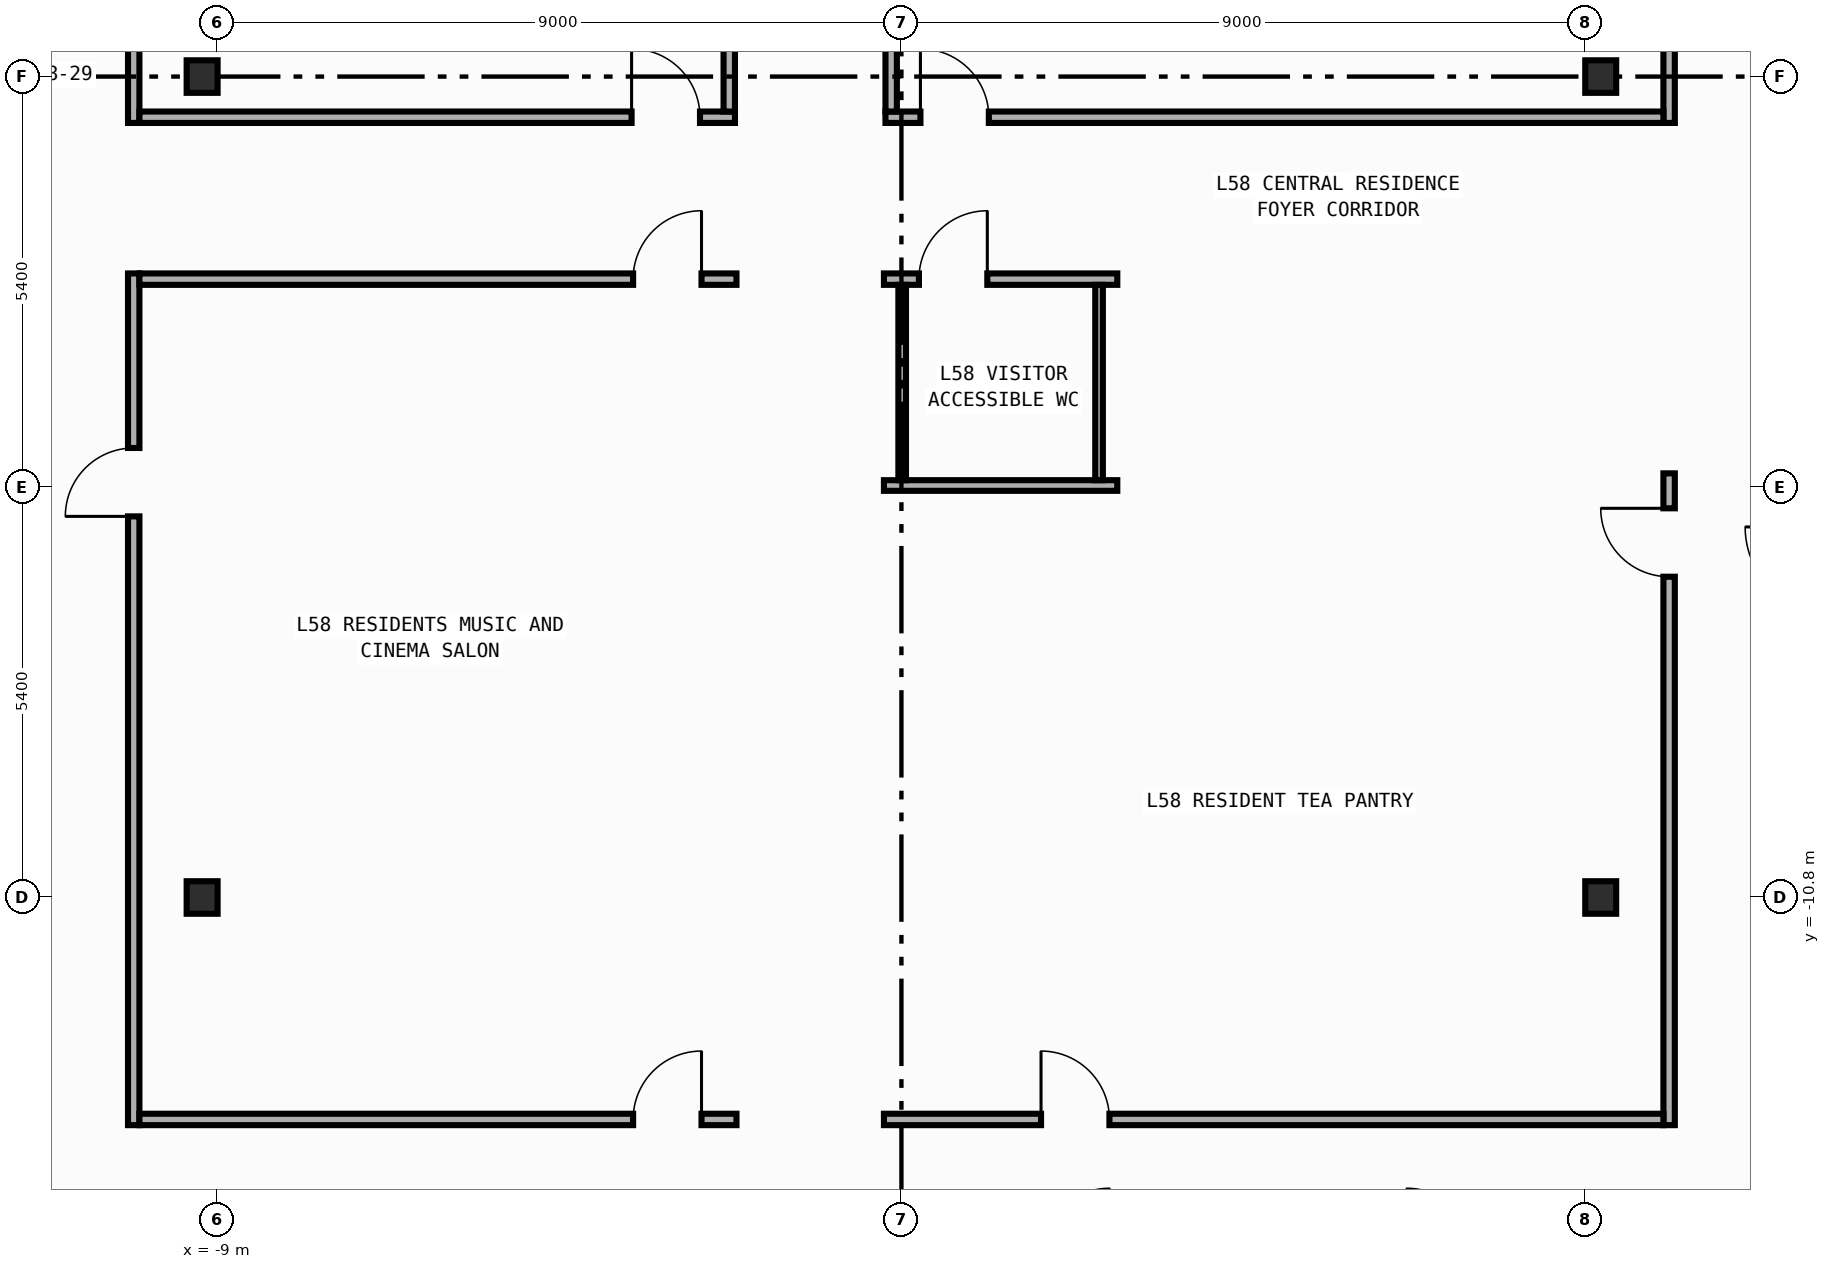
"""IFC4 building model, lengths in metres.
Left out: names, types, materials, properties, quantities, classifications, styles, units other than length and angle.
Written with IfcOpenShell. Run it as: python <this file> out.ifc"""

import sys

from ifc_helpers import new_model, si_unit, direction, frame, frame_2d, origin, origin_2d, place, context, subcontext, project, spatial, rectangle, i_section, extrude, element, fill, save


model = new_model("IFC4")
c1 = context("Model", 3, precision=1e-05, world=origin(), true_north=direction((0.0, 1.0)))
c2 = subcontext(c1, "Body", "Model", "MODEL_VIEW")
j1 = project(units=[si_unit("LENGTHUNIT", "METRE"), si_unit("PLANEANGLEUNIT", "RADIAN")], contexts=[c1])
p1 = place(None, origin())
s1 = spatial("IfcSite", under=j1, at=p1, CompositionType="ELEMENT")
p2 = place(p1, origin())
s2 = spatial("IfcBuilding", under=s1, at=p2, CompositionType="ELEMENT")
p3 = place(p2, frame((0.0, 0.0, 247.6)))
s3 = spatial("IfcBuildingStorey", under=s2, at=p3, CompositionType="ELEMENT", Elevation=247.6)
for number, where, z_axis, x_axis in (
    (1, (-9.2, -10.8, 0.0), (0.0, 0.0, 1.0), (1.0, 0.0, 0.0)),
    (2, (-9.2, 0.0, 0.0), (0.0, 0.0, 1.0), (1.0, 0.0, 0.0)),
    (3, (9.2, -10.8, 0.0), (0.0, 0.0, 1.0), (1.0, 0.0, 0.0)),
    (4, (9.2, 0.0, 0.0), (0.0, 0.0, 1.0), (1.0, 0.0, 0.0)),
):
    element("IfcColumn", number, at=place(p3, frame(where, z_axis=z_axis, x_axis=x_axis)), inside=s3, PredefinedType="COLUMN", context=c2, shape_type="SweptSolid", body=[
        extrude(i_section(OverallWidth=0.407, OverallDepth=0.428, WebThickness=0.02, FlangeThickness=0.035, FilletRadius=0.022, at=origin_2d()), origin(), (0.0, 0.0, 1.0), 3.6),
    ])
p4 = place(p3, frame((-10.1, -0.61, 0.0), z_axis=(0.0, 0.0, 1.0), x_axis=(0.0, 1.0, 0.0)))
e5 = element("IfcWall", 5, at=p4, inside=s3, PredefinedType="PARTITIONING", context=c2, shape_type="SweptSolid", body=[
    extrude(rectangle(XDim=14.405, YDim=0.15, at=frame_2d((7.203, 0.0))), origin(), (0.0, 0.0, 1.0), 3.34),
])
p5 = place(p4, frame((5.535, 0.0, 0.0)))
e6 = element("IfcOpeningElement", 6, at=p5, cuts=e5, PredefinedType="OPENING", context=c2, shape_type="SweptSolid", body=[
    extrude(rectangle(XDim=0.9, YDim=2.15, at=frame_2d((0.45, 1.075))), frame((0.0, 0.085, 0.0), z_axis=(0.0, -1.0, 0.0), x_axis=(1.0, 0.0, 0.0)), (0.0, 0.0, 1.0), 0.17),
])
p6 = place(p3, frame((-10.1, -13.795, 0.0), z_axis=(0.0, 0.0, 1.0), x_axis=(0.0, 1.0, 0.0)))
e7 = element("IfcWall", 7, at=p6, inside=s3, PredefinedType="PARTITIONING", context=c2, shape_type="SweptSolid", body=[
    extrude(rectangle(XDim=11.205, YDim=0.15, at=frame_2d((5.603, 0.0))), origin(), (0.0, 0.0, 1.0), 3.34),
])
p7 = place(p6, frame((8.009, 0.0, 0.0)))
e8 = element("IfcOpeningElement", 8, at=p7, cuts=e7, PredefinedType="OPENING", context=c2, shape_type="SweptSolid", body=[
    extrude(rectangle(XDim=0.9, YDim=2.15, at=frame_2d((0.45, 1.075))), frame((0.0, 0.085, 0.0), z_axis=(0.0, -1.0, 0.0), x_axis=(1.0, 0.0, 0.0)), (0.0, 0.0, 1.0), 0.17),
])
p8 = place(p3, frame((10.1, -0.61, 0.0), z_axis=(0.0, 0.0, 1.0), x_axis=(0.0, 1.0, 0.0)))
e9 = element("IfcWall", 9, at=p8, inside=s3, PredefinedType="PARTITIONING", context=c2, shape_type="SweptSolid", body=[
    extrude(rectangle(XDim=14.405, YDim=0.15, at=frame_2d((7.203, 0.0))), origin(), (0.0, 0.0, 1.0), 3.34),
])
p9 = place(p8, frame((5.535, 0.0, 0.0)))
e10 = element("IfcOpeningElement", 10, at=p9, cuts=e9, PredefinedType="OPENING", context=c2, shape_type="SweptSolid", body=[
    extrude(rectangle(XDim=0.9, YDim=2.15, at=frame_2d((0.45, 1.075))), frame((0.0, 0.085, 0.0), z_axis=(0.0, -1.0, 0.0), x_axis=(1.0, 0.0, 0.0)), (0.0, 0.0, 1.0), 0.17),
])
p10 = place(p3, frame((10.1, -13.795, 0.0), z_axis=(0.0, 0.0, 1.0), x_axis=(0.0, 1.0, 0.0)))
e11 = element("IfcWall", 11, at=p10, inside=s3, PredefinedType="PARTITIONING", context=c2, shape_type="SweptSolid", body=[
    extrude(rectangle(XDim=8.575, YDim=0.15, at=frame_2d((4.288, 0.0))), origin(), (0.0, 0.0, 1.0), 3.34),
])
p11 = place(p10, frame((7.215, 0.0, 0.0)))
e12 = element("IfcOpeningElement", 12, at=p11, cuts=e11, PredefinedType="OPENING", context=c2, shape_type="SweptSolid", body=[
    extrude(rectangle(XDim=0.9, YDim=2.15, at=frame_2d((0.45, 1.075))), frame((0.0, 0.085, 0.0), z_axis=(0.0, -1.0, 0.0), x_axis=(1.0, 0.0, 0.0)), (0.0, 0.0, 1.0), 0.17),
])
p12 = place(p3, frame((-10.025, -0.535, 0.0), z_axis=(0.0, 0.0, 1.0), x_axis=(1.0, 0.0, 0.0)))
e13 = element("IfcWall", 13, at=p12, inside=s3, PredefinedType="PARTITIONING", context=c2, shape_type="SweptSolid", body=[
    extrude(rectangle(XDim=7.835, YDim=0.15, at=frame_2d((3.917, 0.0))), origin(), (0.0, 0.0, 1.0), 3.34),
])
p13 = place(p12, frame((6.475, 0.0, 0.0)))
e14 = element("IfcOpeningElement", 14, at=p13, cuts=e13, PredefinedType="OPENING", context=c2, shape_type="SweptSolid", body=[
    extrude(rectangle(XDim=0.9, YDim=2.15, at=frame_2d((0.45, 1.075))), frame((0.0, 0.085, 0.0), z_axis=(0.0, -1.0, 0.0), x_axis=(1.0, 0.0, 0.0)), (0.0, 0.0, 1.0), 0.17),
])
p14 = place(p3, frame((-10.025, -2.665, 0.0), z_axis=(0.0, 0.0, 1.0), x_axis=(1.0, 0.0, 0.0)))
e15 = element("IfcWall", 15, at=p14, inside=s3, PredefinedType="PARTITIONING", context=c2, shape_type="SweptSolid", body=[
    extrude(rectangle(XDim=7.855, YDim=0.15, at=frame_2d((3.927, 0.0))), origin(), (0.0, 0.0, 1.0), 3.34),
])
p15 = place(p14, frame((6.495, 0.0, 0.0)))
e16 = element("IfcOpeningElement", 16, at=p15, cuts=e15, PredefinedType="OPENING", context=c2, shape_type="SweptSolid", body=[
    extrude(rectangle(XDim=0.9, YDim=2.15, at=frame_2d((0.45, 1.075))), frame((0.0, 0.085, 0.0), z_axis=(0.0, -1.0, 0.0), x_axis=(1.0, 0.0, 0.0)), (0.0, 0.0, 1.0), 0.17),
])
p16 = place(p3, frame((-0.21, -0.535, 0.0), z_axis=(0.0, 0.0, 1.0), x_axis=(1.0, 0.0, 0.0)))
e17 = element("IfcWall", 17, at=p16, inside=s3, PredefinedType="PARTITIONING", context=c2, shape_type="SweptSolid", body=[
    extrude(rectangle(XDim=10.235, YDim=0.15, at=frame_2d((5.117, 0.0))), origin(), (0.0, 0.0, 1.0), 3.34),
])
p17 = place(p16, frame((0.46, 0.0, 0.0)))
e18 = element("IfcOpeningElement", 18, at=p17, cuts=e17, PredefinedType="OPENING", context=c2, shape_type="SweptSolid", body=[
    extrude(rectangle(XDim=0.9, YDim=2.15, at=frame_2d((0.45, 1.075))), frame((0.0, 0.085, 0.0), z_axis=(0.0, -1.0, 0.0), x_axis=(1.0, 0.0, 0.0)), (0.0, 0.0, 1.0), 0.17),
])
p18 = place(p3, frame((-0.23, -2.665, 0.0), z_axis=(0.0, 0.0, 1.0), x_axis=(1.0, 0.0, 0.0)))
e19 = element("IfcWall", 19, at=p18, inside=s3, PredefinedType="PARTITIONING", context=c2, shape_type="SweptSolid", body=[
    extrude(rectangle(XDim=3.07, YDim=0.15, at=frame_2d((1.535, 0.0))), origin(), (0.0, 0.0, 1.0), 3.34),
])
p19 = place(p18, frame((0.46, 0.0, 0.0)))
e20 = element("IfcOpeningElement", 20, at=p19, cuts=e19, PredefinedType="OPENING", context=c2, shape_type="SweptSolid", body=[
    extrude(rectangle(XDim=0.9, YDim=2.15, at=frame_2d((0.45, 1.075))), frame((0.0, 0.085, 0.0), z_axis=(0.0, -1.0, 0.0), x_axis=(1.0, 0.0, 0.0)), (0.0, 0.0, 1.0), 0.17),
])
p20 = place(p3, frame((-2.265, -0.46, 0.0), z_axis=(0.0, 0.0, 1.0), x_axis=(0.0, 1.0, 0.0)))
e21 = element("IfcWall", 21, at=p20, inside=s3, PredefinedType="PARTITIONING", context=c2, shape_type="SweptSolid", body=[
    extrude(rectangle(XDim=14.255, YDim=0.15, at=frame_2d((7.127, 0.0))), origin(), (0.0, 0.0, 1.0), 3.34),
])
p21 = place(p20, frame((5.474, 0.0, 0.0)))
e22 = element("IfcOpeningElement", 22, at=p21, cuts=e21, PredefinedType="OPENING", context=c2, shape_type="SweptSolid", body=[
    extrude(rectangle(XDim=0.9, YDim=2.15, at=frame_2d((0.45, 1.075))), frame((0.0, 0.085, 0.0), z_axis=(0.0, -1.0, 0.0), x_axis=(1.0, 0.0, 0.0)), (0.0, 0.0, 1.0), 0.17),
])
p22 = place(p3, frame((-0.135, -0.46, 0.0), z_axis=(0.0, 0.0, 1.0), x_axis=(0.0, 1.0, 0.0)))
e23 = element("IfcWall", 23, at=p22, inside=s3, PredefinedType="PARTITIONING", context=c2, shape_type="SweptSolid", body=[
    extrude(rectangle(XDim=14.255, YDim=0.15, at=frame_2d((7.127, 0.0))), origin(), (0.0, 0.0, 1.0), 3.34),
])
p23 = place(p22, frame((5.474, 0.0, 0.0)))
e24 = element("IfcOpeningElement", 24, at=p23, cuts=e23, PredefinedType="OPENING", context=c2, shape_type="SweptSolid", body=[
    extrude(rectangle(XDim=0.9, YDim=2.15, at=frame_2d((0.45, 1.075))), frame((0.0, 0.085, 0.0), z_axis=(0.0, -1.0, 0.0), x_axis=(1.0, 0.0, 0.0)), (0.0, 0.0, 1.0), 0.17),
])
p24 = place(p3, frame((-10.025, -13.72, 0.0), z_axis=(0.0, 0.0, 1.0), x_axis=(1.0, 0.0, 0.0)))
e25 = element("IfcWall", 25, at=p24, inside=s3, PredefinedType="PARTITIONING", context=c2, shape_type="SweptSolid", body=[
    extrude(rectangle(XDim=7.855, YDim=0.15, at=frame_2d((3.927, 0.0))), origin(), (0.0, 0.0, 1.0), 3.34),
])
p25 = place(p24, frame((6.495, 0.0, 0.0)))
e26 = element("IfcOpeningElement", 26, at=p25, cuts=e25, PredefinedType="OPENING", context=c2, shape_type="SweptSolid", body=[
    extrude(rectangle(XDim=0.9, YDim=2.15, at=frame_2d((0.45, 1.075))), frame((0.0, 0.085, 0.0), z_axis=(0.0, -1.0, 0.0), x_axis=(1.0, 0.0, 0.0)), (0.0, 0.0, 1.0), 0.17),
])
p26 = place(p3, frame((-0.23, -13.72, 0.0), z_axis=(0.0, 0.0, 1.0), x_axis=(1.0, 0.0, 0.0)))
e27 = element("IfcWall", 27, at=p26, inside=s3, PredefinedType="PARTITIONING", context=c2, shape_type="SweptSolid", body=[
    extrude(rectangle(XDim=10.255, YDim=0.15, at=frame_2d((5.127, 0.0))), origin(), (0.0, 0.0, 1.0), 3.34),
])
p27 = place(p26, frame((2.067, 0.0, 0.0)))
e28 = element("IfcOpeningElement", 28, at=p27, cuts=e27, PredefinedType="OPENING", context=c2, shape_type="SweptSolid", body=[
    extrude(rectangle(XDim=0.9, YDim=2.15, at=frame_2d((0.45, 1.075))), frame((0.0, 0.085, 0.0), z_axis=(0.0, -1.0, 0.0), x_axis=(1.0, 0.0, 0.0)), (0.0, 0.0, 1.0), 0.17),
])
p28 = place(p3, frame((-0.23, -5.38, 0.0), z_axis=(0.0, 0.0, 1.0), x_axis=(1.0, 0.0, 0.0)))
e29 = element("IfcWall", 29, at=p28, inside=s3, PredefinedType="PARTITIONING", context=c2, shape_type="SweptSolid", body=[
    extrude(rectangle(XDim=3.07, YDim=0.14, at=frame_2d((1.535, 0.0))), origin(), (0.0, 0.0, 1.0), 3.34),
])
for number, where, z_axis, x_axis in (
    (30, (2.6, -2.74, 0.0), (0.0, 0.0, 1.0), (0.0, -1.0, 0.0)),
    (31, (0.01, -5.31, 0.0), (0.0, 0.0, 1.0), (0.0, 1.0, 0.0)),
):
    element("IfcWall", number, at=place(p3, frame(where, z_axis=z_axis, x_axis=x_axis)), inside=s3, PredefinedType="PARTITIONING", context=c2, shape_type="SweptSolid", body=[
        extrude(rectangle(XDim=2.57, YDim=0.1, at=frame_2d((1.285, 0.0))), origin(), (0.0, 0.0, 1.0), 3.34),
    ])
p29 = place(p7, origin())
e32 = element("IfcDoor", 32, at=p29, inside=s3, OperationType="SINGLE_SWING_LEFT", PredefinedType="DOOR", context=c2, shape_type="SweptSolid", body=[
    extrude(rectangle(XDim=0.9, YDim=2.15, at=frame_2d((0.45, 1.075))), frame((0.0, 0.025, 0.0), z_axis=(0.0, -1.0, 0.0), x_axis=(1.0, 0.0, 0.0)), (0.0, 0.0, 1.0), 0.05),
])
fill(e8, e32)
p30 = place(p11, origin())
e33 = element("IfcDoor", 33, at=p30, inside=s3, OperationType="SINGLE_SWING_RIGHT", PredefinedType="DOOR", context=c2, shape_type="SweptSolid", body=[
    extrude(rectangle(XDim=0.9, YDim=2.15, at=frame_2d((0.45, 1.075))), frame((0.0, 0.025, 0.0), z_axis=(0.0, -1.0, 0.0), x_axis=(1.0, 0.0, 0.0)), (0.0, 0.0, 1.0), 0.05),
])
fill(e12, e33)
p31 = place(p13, origin())
e34 = element("IfcDoor", 34, at=p31, inside=s3, OperationType="SINGLE_SWING_LEFT", PredefinedType="DOOR", context=c2, shape_type="SweptSolid", body=[
    extrude(rectangle(XDim=0.9, YDim=2.15, at=frame_2d((0.45, 1.075))), frame((0.0, 0.025, 0.0), z_axis=(0.0, -1.0, 0.0), x_axis=(1.0, 0.0, 0.0)), (0.0, 0.0, 1.0), 0.05),
])
fill(e14, e34)
p32 = place(p15, origin())
e35 = element("IfcDoor", 35, at=p32, inside=s3, OperationType="SINGLE_SWING_RIGHT", PredefinedType="DOOR", context=c2, shape_type="SweptSolid", body=[
    extrude(rectangle(XDim=0.9, YDim=2.15, at=frame_2d((0.45, 1.075))), frame((0.0, 0.025, 0.0), z_axis=(0.0, -1.0, 0.0), x_axis=(1.0, 0.0, 0.0)), (0.0, 0.0, 1.0), 0.05),
])
fill(e16, e35)
p33 = place(p17, origin())
e36 = element("IfcDoor", 36, at=p33, inside=s3, OperationType="SINGLE_SWING_LEFT", PredefinedType="DOOR", context=c2, shape_type="SweptSolid", body=[
    extrude(rectangle(XDim=0.9, YDim=2.15, at=frame_2d((0.45, 1.075))), frame((0.0, 0.025, 0.0), z_axis=(0.0, -1.0, 0.0), x_axis=(1.0, 0.0, 0.0)), (0.0, 0.0, 1.0), 0.05),
])
fill(e18, e36)
p34 = place(p19, origin())
e37 = element("IfcDoor", 37, at=p34, inside=s3, OperationType="SINGLE_SWING_RIGHT", PredefinedType="DOOR", context=c2, shape_type="SweptSolid", body=[
    extrude(rectangle(XDim=0.9, YDim=2.15, at=frame_2d((0.45, 1.075))), frame((0.0, 0.025, 0.0), z_axis=(0.0, -1.0, 0.0), x_axis=(1.0, 0.0, 0.0)), (0.0, 0.0, 1.0), 0.05),
])
fill(e20, e37)
p35 = place(p25, origin())
e38 = element("IfcDoor", 38, at=p35, inside=s3, OperationType="SINGLE_SWING_RIGHT", PredefinedType="DOOR", context=c2, shape_type="SweptSolid", body=[
    extrude(rectangle(XDim=0.9, YDim=2.15, at=frame_2d((0.45, 1.075))), frame((0.0, 0.025, 0.0), z_axis=(0.0, -1.0, 0.0), x_axis=(1.0, 0.0, 0.0)), (0.0, 0.0, 1.0), 0.05),
])
fill(e26, e38)
p36 = place(p27, origin())
e39 = element("IfcDoor", 39, at=p36, inside=s3, OperationType="SINGLE_SWING_LEFT", PredefinedType="DOOR", context=c2, shape_type="SweptSolid", body=[
    extrude(rectangle(XDim=0.9, YDim=2.15, at=frame_2d((0.45, 1.075))), frame((0.0, 0.025, 0.0), z_axis=(0.0, -1.0, 0.0), x_axis=(1.0, 0.0, 0.0)), (0.0, 0.0, 1.0), 0.05),
])
fill(e28, e39)
save(model, sys.argv[1])
